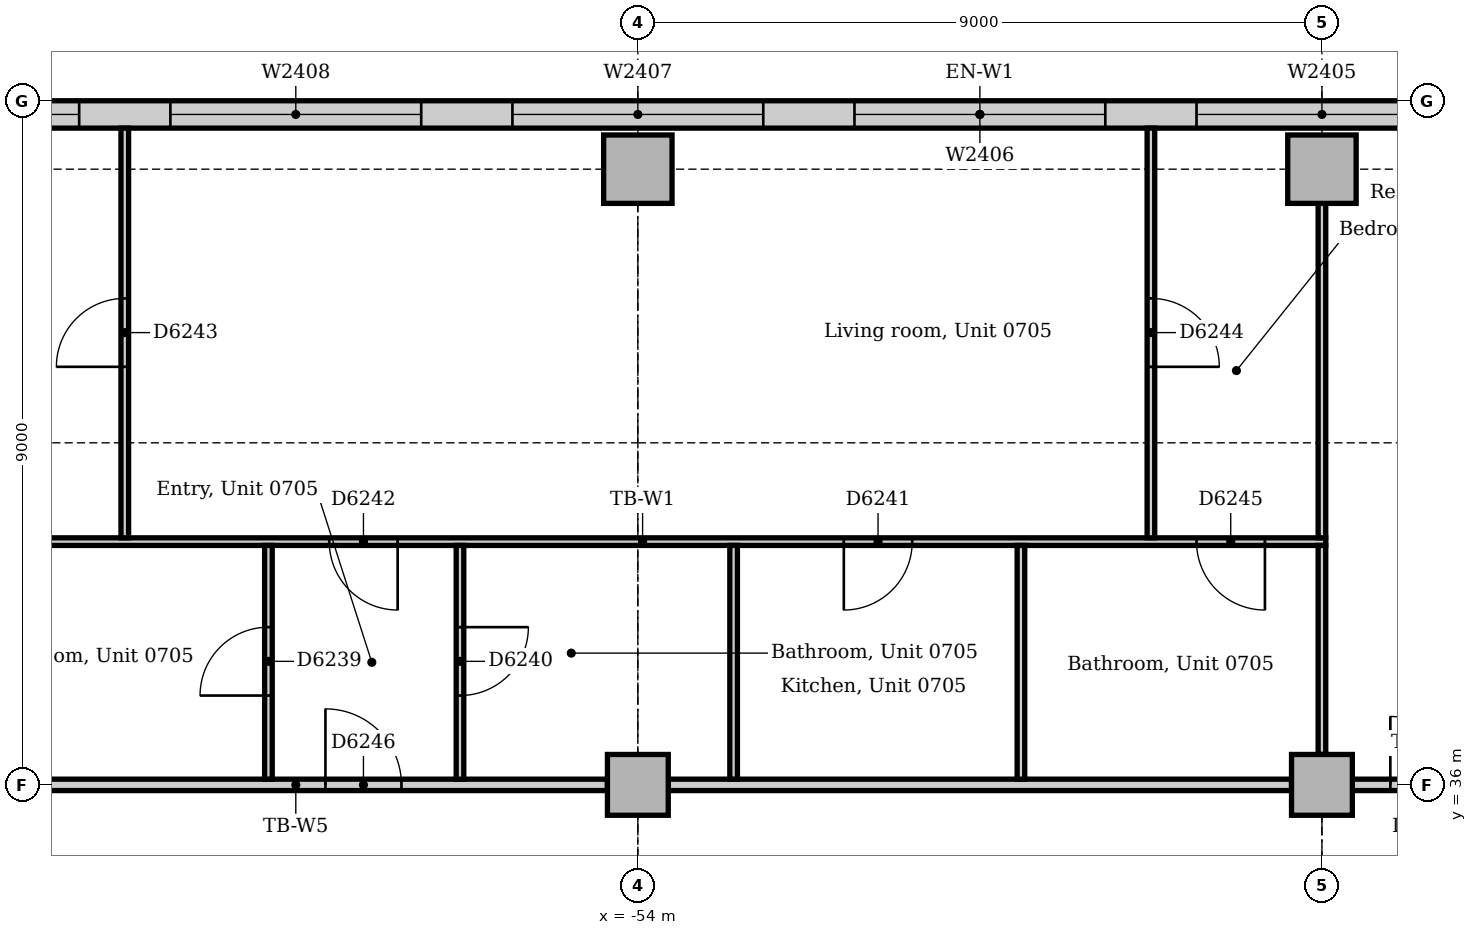
"""IFC4 building model, lengths in metres.
Left out: names, types, materials, properties, quantities, classifications, styles, units other than length and angle.
Written with IfcOpenShell. Run it as: python <this file> out.ifc"""

import sys

from ifc_helpers import new_model, si_unit, direction, frame, frame_2d, origin, origin_2d, place, context, subcontext, project, spatial, rectangle, extrude, element, fill, save


model = new_model("IFC4")
c1 = context("Model", 3, precision=1e-05, world=origin(), true_north=direction((0.0, 1.0)))
c2 = subcontext(c1, "Body", "Model", "MODEL_VIEW")
j1 = project(units=[si_unit("LENGTHUNIT", "METRE"), si_unit("PLANEANGLEUNIT", "RADIAN")], contexts=[c1])
p1 = place(None, origin())
s1 = spatial("IfcSite", under=j1, at=p1, CompositionType="ELEMENT")
p2 = place(p1, origin())
s2 = spatial("IfcBuilding", under=s1, at=p2, CompositionType="ELEMENT")
p3 = place(p2, frame((0.0, 0.0, 34.0)))
s3 = spatial("IfcBuildingStorey", under=s2, at=p3, CompositionType="ELEMENT", Elevation=34.0)
for number, where, z_axis, x_axis in (
    (1, (-54.0, 44.1, 0.0), (0.0, 0.0, 1.0), (1.0, 0.0, 0.0)),
    (2, (-45.0, 44.1, 0.0), (0.0, 0.0, 1.0), (1.0, 0.0, 0.0)),
):
    element("IfcColumn", number, at=place(p3, frame(where, z_axis=z_axis, x_axis=x_axis)), inside=s3, PredefinedType="COLUMN", context=c2, shape_type="SweptSolid", body=[
        extrude(rectangle(XDim=0.9, YDim=0.9, at=origin_2d()), origin(), (0.0, 0.0, 1.0), 3.85),
    ])
for number, where, z_axis, x_axis in (
    (3, (-54.0, 36.0, 0.0), (0.0, 0.0, 1.0), (1.0, 0.0, 0.0)),
    (4, (-45.0, 36.0, 0.0), (0.0, 0.0, 1.0), (1.0, 0.0, 0.0)),
):
    element("IfcColumn", number, at=place(p3, frame(where, z_axis=z_axis, x_axis=x_axis)), inside=s3, PredefinedType="COLUMN", context=c2, shape_type="SweptSolid", body=[
        extrude(rectangle(XDim=0.8, YDim=0.8, at=origin_2d()), origin(), (0.0, 0.0, 1.0), 3.85),
    ])
p4 = place(p3, frame((-31.243, 44.82, 0.0), z_axis=(0.0, 0.0, 1.0), x_axis=(-1.0, 0.0, 0.0)))
e5 = element("IfcWall", 5, at=p4, inside=s3, PredefinedType="STANDARD", context=c2, shape_type="SweptSolid", body=[
    extrude(rectangle(XDim=36.515, YDim=0.36, at=frame_2d((18.257, 0.0))), origin(), (0.0, 0.0, 1.0), 3.85),
])
p5 = place(p4, frame((3.107, 0.0, 0.9)))
e6 = element("IfcOpeningElement", 6, at=p5, cuts=e5, PredefinedType="OPENING", context=c2, shape_type="SweptSolid", body=[
    extrude(rectangle(XDim=3.3, YDim=1.6, at=frame_2d((1.65, 0.8))), frame((0.0, 0.19, 0.0), z_axis=(0.0, -1.0, 0.0), x_axis=(1.0, 0.0, 0.0)), (0.0, 0.0, 1.0), 0.38),
])
p6 = place(p4, frame((7.607, 0.0, 0.9)))
e7 = element("IfcOpeningElement", 7, at=p6, cuts=e5, PredefinedType="OPENING", context=c2, shape_type="SweptSolid", body=[
    extrude(rectangle(XDim=3.3, YDim=1.6, at=frame_2d((1.65, 0.8))), frame((0.0, 0.19, 0.0), z_axis=(0.0, -1.0, 0.0), x_axis=(1.0, 0.0, 0.0)), (0.0, 0.0, 1.0), 0.38),
])
p7 = place(p4, frame((12.107, 0.0, 0.9)))
e8 = element("IfcOpeningElement", 8, at=p7, cuts=e5, PredefinedType="OPENING", context=c2, shape_type="SweptSolid", body=[
    extrude(rectangle(XDim=3.3, YDim=1.6, at=frame_2d((1.65, 0.8))), frame((0.0, 0.19, 0.0), z_axis=(0.0, -1.0, 0.0), x_axis=(1.0, 0.0, 0.0)), (0.0, 0.0, 1.0), 0.38),
])
p8 = place(p4, frame((16.607, 0.0, 0.9)))
e9 = element("IfcOpeningElement", 9, at=p8, cuts=e5, PredefinedType="OPENING", context=c2, shape_type="SweptSolid", body=[
    extrude(rectangle(XDim=3.3, YDim=1.6, at=frame_2d((1.65, 0.8))), frame((0.0, 0.19, 0.0), z_axis=(0.0, -1.0, 0.0), x_axis=(1.0, 0.0, 0.0)), (0.0, 0.0, 1.0), 0.38),
])
p9 = place(p4, frame((21.107, 0.0, 0.9)))
e10 = element("IfcOpeningElement", 10, at=p9, cuts=e5, PredefinedType="OPENING", context=c2, shape_type="SweptSolid", body=[
    extrude(rectangle(XDim=3.3, YDim=1.6, at=frame_2d((1.65, 0.8))), frame((0.0, 0.19, 0.0), z_axis=(0.0, -1.0, 0.0), x_axis=(1.0, 0.0, 0.0)), (0.0, 0.0, 1.0), 0.38),
])
p10 = place(p4, frame((25.607, 0.0, 0.9)))
e11 = element("IfcOpeningElement", 11, at=p10, cuts=e5, PredefinedType="OPENING", context=c2, shape_type="SweptSolid", body=[
    extrude(rectangle(XDim=3.3, YDim=1.6, at=frame_2d((1.65, 0.8))), frame((0.0, 0.19, 0.0), z_axis=(0.0, -1.0, 0.0), x_axis=(1.0, 0.0, 0.0)), (0.0, 0.0, 1.0), 0.38),
])
p11 = place(p4, frame((30.107, 0.0, 0.9)))
e12 = element("IfcOpeningElement", 12, at=p11, cuts=e5, PredefinedType="OPENING", context=c2, shape_type="SweptSolid", body=[
    extrude(rectangle(XDim=3.3, YDim=1.6, at=frame_2d((1.65, 0.8))), frame((0.0, 0.19, 0.0), z_axis=(0.0, -1.0, 0.0), x_axis=(1.0, 0.0, 0.0)), (0.0, 0.0, 1.0), 0.38),
])
p12 = place(p3, frame((-44.6, 36.0, 0.0), z_axis=(0.0, 0.0, 1.0), x_axis=(1.0, 0.0, 0.0)))
e13 = element("IfcWall", 13, at=p12, inside=s3, PredefinedType="PARTITIONING", context=c2, shape_type="SweptSolid", body=[
    extrude(rectangle(XDim=1.875, YDim=0.15, at=frame_2d((0.938, 0.0))), origin(), (0.0, 0.0, 1.0), 3.602),
])
p13 = place(p12, frame((0.5, 0.0, 0.0)))
e14 = element("IfcOpeningElement", 14, at=p13, cuts=e13, PredefinedType="OPENING", context=c2, shape_type="SweptSolid", body=[
    extrude(rectangle(XDim=0.9, YDim=2.1, at=frame_2d((0.45, 1.05))), frame((0.0, 0.085, 0.0), z_axis=(0.0, -1.0, 0.0), x_axis=(1.0, 0.0, 0.0)), (0.0, 0.0, 1.0), 0.17),
])
p14 = place(p3, frame((-53.6, 36.0, 0.0), z_axis=(0.0, 0.0, 1.0), x_axis=(1.0, 0.0, 0.0)))
e15 = element("IfcWall", 15, at=p14, inside=s3, PredefinedType="PARTITIONING", context=c2, shape_type="SweptSolid", body=[
    extrude(rectangle(XDim=8.2, YDim=0.15, at=frame_2d((4.1, 0.0))), origin(), (0.0, 0.0, 1.0), 3.15),
])
p15 = place(p3, frame((-62.6, 36.0, 0.0), z_axis=(0.0, 0.0, 1.0), x_axis=(1.0, 0.0, 0.0)))
e16 = element("IfcWall", 16, at=p15, inside=s3, PredefinedType="PARTITIONING", context=c2, shape_type="SweptSolid", body=[
    extrude(rectangle(XDim=8.2, YDim=0.15, at=frame_2d((4.1, 0.0))), origin(), (0.0, 0.0, 1.0), 3.15),
])
p16 = place(p15, frame((4.49, 0.0, 0.0)))
e17 = element("IfcOpeningElement", 17, at=p16, cuts=e16, PredefinedType="OPENING", context=c2, shape_type="SweptSolid", body=[
    extrude(rectangle(XDim=1.0, YDim=2.1, at=frame_2d((0.5, 1.05))), frame((0.0, 0.085, 0.0), z_axis=(0.0, -1.0, 0.0), x_axis=(1.0, 0.0, 0.0)), (0.0, 0.0, 1.0), 0.17),
])
p17 = place(p3, frame((-62.925, 39.2, 0.0), z_axis=(0.0, 0.0, 1.0), x_axis=(1.0, 0.0, 0.0)))
e18 = element("IfcWall", 18, at=p17, inside=s3, PredefinedType="PARTITIONING", context=c2, shape_type="SweptSolid", body=[
    extrude(rectangle(XDim=17.975, YDim=0.1, at=frame_2d((8.988, 0.0))), origin(), (0.0, 0.0, 1.0), 3.85),
])
p18 = place(p17, frame((11.635, 0.0, 0.0)))
e19 = element("IfcOpeningElement", 19, at=p18, cuts=e18, PredefinedType="OPENING", context=c2, shape_type="SweptSolid", body=[
    extrude(rectangle(XDim=0.9, YDim=2.1, at=frame_2d((0.45, 1.05))), frame((0.0, 0.06, 0.0), z_axis=(0.0, -1.0, 0.0), x_axis=(1.0, 0.0, 0.0)), (0.0, 0.0, 1.0), 0.12),
])
p19 = place(p17, frame((4.865, 0.0, 0.0)))
e20 = element("IfcOpeningElement", 20, at=p19, cuts=e18, PredefinedType="OPENING", context=c2, shape_type="SweptSolid", body=[
    extrude(rectangle(XDim=0.9, YDim=2.1, at=frame_2d((0.45, 1.05))), frame((0.0, 0.06, 0.0), z_axis=(0.0, -1.0, 0.0), x_axis=(1.0, 0.0, 0.0)), (0.0, 0.0, 1.0), 0.12),
])
p20 = place(p17, frame((16.275, 0.0, 0.0)))
e21 = element("IfcOpeningElement", 21, at=p20, cuts=e18, PredefinedType="OPENING", context=c2, shape_type="SweptSolid", body=[
    extrude(rectangle(XDim=0.9, YDim=2.1, at=frame_2d((0.45, 1.05))), frame((0.0, 0.06, 0.0), z_axis=(0.0, -1.0, 0.0), x_axis=(1.0, 0.0, 0.0)), (0.0, 0.0, 1.0), 0.12),
])
p21 = place(p3, frame((-45.0, 39.25, 0.0), z_axis=(0.0, 0.0, 1.0), x_axis=(0.0, 1.0, 0.0)))
e22 = element("IfcWall", 22, at=p21, inside=s3, PredefinedType="PARTITIONING", context=c2, shape_type="SweptSolid", body=[
    extrude(rectangle(XDim=4.4, YDim=0.1, at=frame_2d((2.2, 0.0))), origin(), (0.0, 0.0, 1.0), 3.158),
])
p22 = place(p3, frame((-45.0, 36.4, 0.0), z_axis=(0.0, 0.0, 1.0), x_axis=(0.0, 1.0, 0.0)))
e23 = element("IfcWall", 23, at=p22, inside=s3, PredefinedType="PARTITIONING", context=c2, shape_type="SweptSolid", body=[
    extrude(rectangle(XDim=2.75, YDim=0.1, at=frame_2d((1.375, 0.0))), origin(), (0.0, 0.0, 1.0), 3.158),
])
p23 = place(p3, frame((-60.75, 39.25, 0.0), z_axis=(0.0, 0.0, 1.0), x_axis=(0.0, 1.0, 0.0)))
e24 = element("IfcWall", 24, at=p23, inside=s3, PredefinedType="PARTITIONING", context=c2, shape_type="SweptSolid", body=[
    extrude(rectangle(XDim=5.39, YDim=0.1, at=frame_2d((2.695, 0.0))), origin(), (0.0, 0.0, 1.0), 3.85),
])
p24 = place(p23, frame((2.25, 0.0, 0.0)))
e25 = element("IfcOpeningElement", 25, at=p24, cuts=e24, PredefinedType="OPENING", context=c2, shape_type="SweptSolid", body=[
    extrude(rectangle(XDim=0.9, YDim=2.1, at=frame_2d((0.45, 1.05))), frame((0.0, 0.06, 0.0), z_axis=(0.0, -1.0, 0.0), x_axis=(1.0, 0.0, 0.0)), (0.0, 0.0, 1.0), 0.12),
])
p25 = place(p3, frame((-47.25, 39.25, 0.0), z_axis=(0.0, 0.0, 1.0), x_axis=(0.0, 1.0, 0.0)))
e26 = element("IfcWall", 26, at=p25, inside=s3, PredefinedType="PARTITIONING", context=c2, shape_type="SweptSolid", body=[
    extrude(rectangle(XDim=5.39, YDim=0.1, at=frame_2d((2.695, 0.0))), origin(), (0.0, 0.0, 1.0), 3.85),
])
p26 = place(p25, frame((2.25, 0.0, 0.0)))
e27 = element("IfcOpeningElement", 27, at=p26, cuts=e26, PredefinedType="OPENING", context=c2, shape_type="SweptSolid", body=[
    extrude(rectangle(XDim=0.9, YDim=2.1, at=frame_2d((0.45, 1.05))), frame((0.0, 0.06, 0.0), z_axis=(0.0, -1.0, 0.0), x_axis=(1.0, 0.0, 0.0)), (0.0, 0.0, 1.0), 0.12),
])
p27 = place(p3, frame((-58.86, 36.075, 0.0), z_axis=(0.0, 0.0, 1.0), x_axis=(0.0, 1.0, 0.0)))
e28 = element("IfcWall", 28, at=p27, inside=s3, PredefinedType="PARTITIONING", context=c2, shape_type="SweptSolid", body=[
    extrude(rectangle(XDim=3.075, YDim=0.1, at=frame_2d((1.538, 0.0))), origin(), (0.0, 0.0, 1.0), 3.85),
])
p28 = place(p27, frame((1.1, 0.0, 0.0)))
e29 = element("IfcOpeningElement", 29, at=p28, cuts=e28, PredefinedType="OPENING", context=c2, shape_type="SweptSolid", body=[
    extrude(rectangle(XDim=0.9, YDim=2.1, at=frame_2d((0.45, 1.05))), frame((0.0, 0.06, 0.0), z_axis=(0.0, -1.0, 0.0), x_axis=(1.0, 0.0, 0.0)), (0.0, 0.0, 1.0), 0.12),
])
p29 = place(p3, frame((-56.34, 36.075, 0.0), z_axis=(0.0, 0.0, 1.0), x_axis=(0.0, 1.0, 0.0)))
e30 = element("IfcWall", 30, at=p29, inside=s3, PredefinedType="PARTITIONING", context=c2, shape_type="SweptSolid", body=[
    extrude(rectangle(XDim=3.075, YDim=0.1, at=frame_2d((1.538, 0.0))), origin(), (0.0, 0.0, 1.0), 3.85),
])
p30 = place(p29, frame((1.1, 0.0, 0.0)))
e31 = element("IfcOpeningElement", 31, at=p30, cuts=e30, PredefinedType="OPENING", context=c2, shape_type="SweptSolid", body=[
    extrude(rectangle(XDim=0.9, YDim=2.1, at=frame_2d((0.45, 1.05))), frame((0.0, 0.06, 0.0), z_axis=(0.0, -1.0, 0.0), x_axis=(1.0, 0.0, 0.0)), (0.0, 0.0, 1.0), 0.12),
])
for number, where, z_axis, x_axis in (
    (32, (-52.74, 36.075, 0.0), (0.0, 0.0, 1.0), (0.0, 1.0, 0.0)),
    (33, (-48.96, 36.075, 0.0), (0.0, 0.0, 1.0), (0.0, 1.0, 0.0)),
):
    element("IfcWall", number, at=place(p3, frame(where, z_axis=z_axis, x_axis=x_axis)), inside=s3, PredefinedType="PARTITIONING", context=c2, shape_type="SweptSolid", body=[
        extrude(rectangle(XDim=3.075, YDim=0.1, at=frame_2d((1.538, 0.0))), origin(), (0.0, 0.0, 1.0), 3.85),
    ])
p31 = place(p7, origin())
e34 = element("IfcWindow", 34, at=p31, inside=s3, PartitioningType="SINGLE_PANEL", PredefinedType="WINDOW", context=c2, shape_type="SweptSolid", body=[
    extrude(rectangle(XDim=3.3, YDim=1.6, at=frame_2d((1.65, 0.8))), frame((0.0, 0.13, 0.0), z_axis=(0.0, -1.0, 0.0), x_axis=(1.0, 0.0, 0.0)), (0.0, 0.0, 1.0), 0.06),
])
fill(e8, e34)
p32 = place(p8, origin())
e35 = element("IfcWindow", 35, at=p32, inside=s3, PartitioningType="SINGLE_PANEL", PredefinedType="WINDOW", context=c2, shape_type="SweptSolid", body=[
    extrude(rectangle(XDim=3.3, YDim=1.6, at=frame_2d((1.65, 0.8))), frame((0.0, 0.13, 0.0), z_axis=(0.0, -1.0, 0.0), x_axis=(1.0, 0.0, 0.0)), (0.0, 0.0, 1.0), 0.06),
])
fill(e9, e35)
p33 = place(p9, origin())
e36 = element("IfcWindow", 36, at=p33, inside=s3, PartitioningType="SINGLE_PANEL", PredefinedType="WINDOW", context=c2, shape_type="SweptSolid", body=[
    extrude(rectangle(XDim=3.3, YDim=1.6, at=frame_2d((1.65, 0.8))), frame((0.0, 0.13, 0.0), z_axis=(0.0, -1.0, 0.0), x_axis=(1.0, 0.0, 0.0)), (0.0, 0.0, 1.0), 0.06),
])
fill(e10, e36)
p34 = place(p10, origin())
e37 = element("IfcWindow", 37, at=p34, inside=s3, PartitioningType="SINGLE_PANEL", PredefinedType="WINDOW", context=c2, shape_type="SweptSolid", body=[
    extrude(rectangle(XDim=3.3, YDim=1.6, at=frame_2d((1.65, 0.8))), frame((0.0, 0.13, 0.0), z_axis=(0.0, -1.0, 0.0), x_axis=(1.0, 0.0, 0.0)), (0.0, 0.0, 1.0), 0.06),
])
fill(e11, e37)
p35 = place(p11, origin())
e38 = element("IfcWindow", 38, at=p35, inside=s3, PartitioningType="SINGLE_PANEL", PredefinedType="WINDOW", context=c2, shape_type="SweptSolid", body=[
    extrude(rectangle(XDim=3.3, YDim=1.6, at=frame_2d((1.65, 0.8))), frame((0.0, 0.13, 0.0), z_axis=(0.0, -1.0, 0.0), x_axis=(1.0, 0.0, 0.0)), (0.0, 0.0, 1.0), 0.06),
])
fill(e12, e38)
p36 = place(p13, origin())
e39 = element("IfcDoor", 39, at=p36, inside=s3, OperationType="SINGLE_SWING_LEFT", PredefinedType="DOOR", context=c2, shape_type="SweptSolid", body=[
    extrude(rectangle(XDim=0.9, YDim=2.1, at=frame_2d((0.45, 1.05))), frame((0.0, 0.025, 0.0), z_axis=(0.0, -1.0, 0.0), x_axis=(1.0, 0.0, 0.0)), (0.0, 0.0, 1.0), 0.05),
])
fill(e14, e39)
p37 = place(p28, origin())
e40 = element("IfcDoor", 40, at=p37, inside=s3, OperationType="SINGLE_SWING_LEFT", PredefinedType="DOOR", context=c2, shape_type="SweptSolid", body=[
    extrude(rectangle(XDim=0.9, YDim=2.1, at=frame_2d((0.45, 1.05))), frame((0.0, 0.025, 0.0), z_axis=(0.0, -1.0, 0.0), x_axis=(1.0, 0.0, 0.0)), (0.0, 0.0, 1.0), 0.05),
])
fill(e29, e40)
p38 = place(p30, frame((0.9, 0.0, 0.0), z_axis=(0.0, 0.0, 1.0), x_axis=(-1.0, 0.0, 0.0)))
e41 = element("IfcDoor", 41, at=p38, inside=s3, OperationType="SINGLE_SWING_LEFT", PredefinedType="DOOR", context=c2, shape_type="SweptSolid", body=[
    extrude(rectangle(XDim=0.9, YDim=2.1, at=frame_2d((0.45, 1.05))), frame((0.0, 0.025, 0.0), z_axis=(0.0, -1.0, 0.0), x_axis=(1.0, 0.0, 0.0)), (0.0, 0.0, 1.0), 0.05),
])
fill(e31, e41)
p39 = place(p18, frame((0.9, 0.0, 0.0), z_axis=(0.0, 0.0, 1.0), x_axis=(-1.0, 0.0, 0.0)))
e42 = element("IfcDoor", 42, at=p39, inside=s3, OperationType="SINGLE_SWING_RIGHT", PredefinedType="DOOR", context=c2, shape_type="SweptSolid", body=[
    extrude(rectangle(XDim=0.9, YDim=2.1, at=frame_2d((0.45, 1.05))), frame((0.0, 0.025, 0.0), z_axis=(0.0, -1.0, 0.0), x_axis=(1.0, 0.0, 0.0)), (0.0, 0.0, 1.0), 0.05),
])
fill(e19, e42)
p40 = place(p19, frame((0.9, 0.0, 0.0), z_axis=(0.0, 0.0, 1.0), x_axis=(-1.0, 0.0, 0.0)))
e43 = element("IfcDoor", 43, at=p40, inside=s3, OperationType="SINGLE_SWING_LEFT", PredefinedType="DOOR", context=c2, shape_type="SweptSolid", body=[
    extrude(rectangle(XDim=0.9, YDim=2.1, at=frame_2d((0.45, 1.05))), frame((0.0, 0.025, 0.0), z_axis=(0.0, -1.0, 0.0), x_axis=(1.0, 0.0, 0.0)), (0.0, 0.0, 1.0), 0.05),
])
fill(e20, e43)
p41 = place(p24, origin())
e44 = element("IfcDoor", 44, at=p41, inside=s3, OperationType="SINGLE_SWING_LEFT", PredefinedType="DOOR", context=c2, shape_type="SweptSolid", body=[
    extrude(rectangle(XDim=0.9, YDim=2.1, at=frame_2d((0.45, 1.05))), frame((0.0, 0.025, 0.0), z_axis=(0.0, -1.0, 0.0), x_axis=(1.0, 0.0, 0.0)), (0.0, 0.0, 1.0), 0.05),
])
fill(e25, e44)
p42 = place(p26, frame((0.9, 0.0, 0.0), z_axis=(0.0, 0.0, 1.0), x_axis=(-1.0, 0.0, 0.0)))
e45 = element("IfcDoor", 45, at=p42, inside=s3, OperationType="SINGLE_SWING_RIGHT", PredefinedType="DOOR", context=c2, shape_type="SweptSolid", body=[
    extrude(rectangle(XDim=0.9, YDim=2.1, at=frame_2d((0.45, 1.05))), frame((0.0, 0.025, 0.0), z_axis=(0.0, -1.0, 0.0), x_axis=(1.0, 0.0, 0.0)), (0.0, 0.0, 1.0), 0.05),
])
fill(e27, e45)
p43 = place(p20, frame((0.9, 0.0, 0.0), z_axis=(0.0, 0.0, 1.0), x_axis=(-1.0, 0.0, 0.0)))
e46 = element("IfcDoor", 46, at=p43, inside=s3, OperationType="SINGLE_SWING_LEFT", PredefinedType="DOOR", context=c2, shape_type="SweptSolid", body=[
    extrude(rectangle(XDim=0.9, YDim=2.1, at=frame_2d((0.45, 1.05))), frame((0.0, 0.025, 0.0), z_axis=(0.0, -1.0, 0.0), x_axis=(1.0, 0.0, 0.0)), (0.0, 0.0, 1.0), 0.05),
])
fill(e21, e46)
p44 = place(p16, origin())
e47 = element("IfcDoor", 47, at=p44, inside=s3, OperationType="SINGLE_SWING_LEFT", PredefinedType="DOOR", context=c2, shape_type="SweptSolid", body=[
    extrude(rectangle(XDim=1.0, YDim=2.1, at=frame_2d((0.5, 1.05))), frame((0.0, 0.025, 0.0), z_axis=(0.0, -1.0, 0.0), x_axis=(1.0, 0.0, 0.0)), (0.0, 0.0, 1.0), 0.05),
])
fill(e17, e47)
save(model, sys.argv[1])
